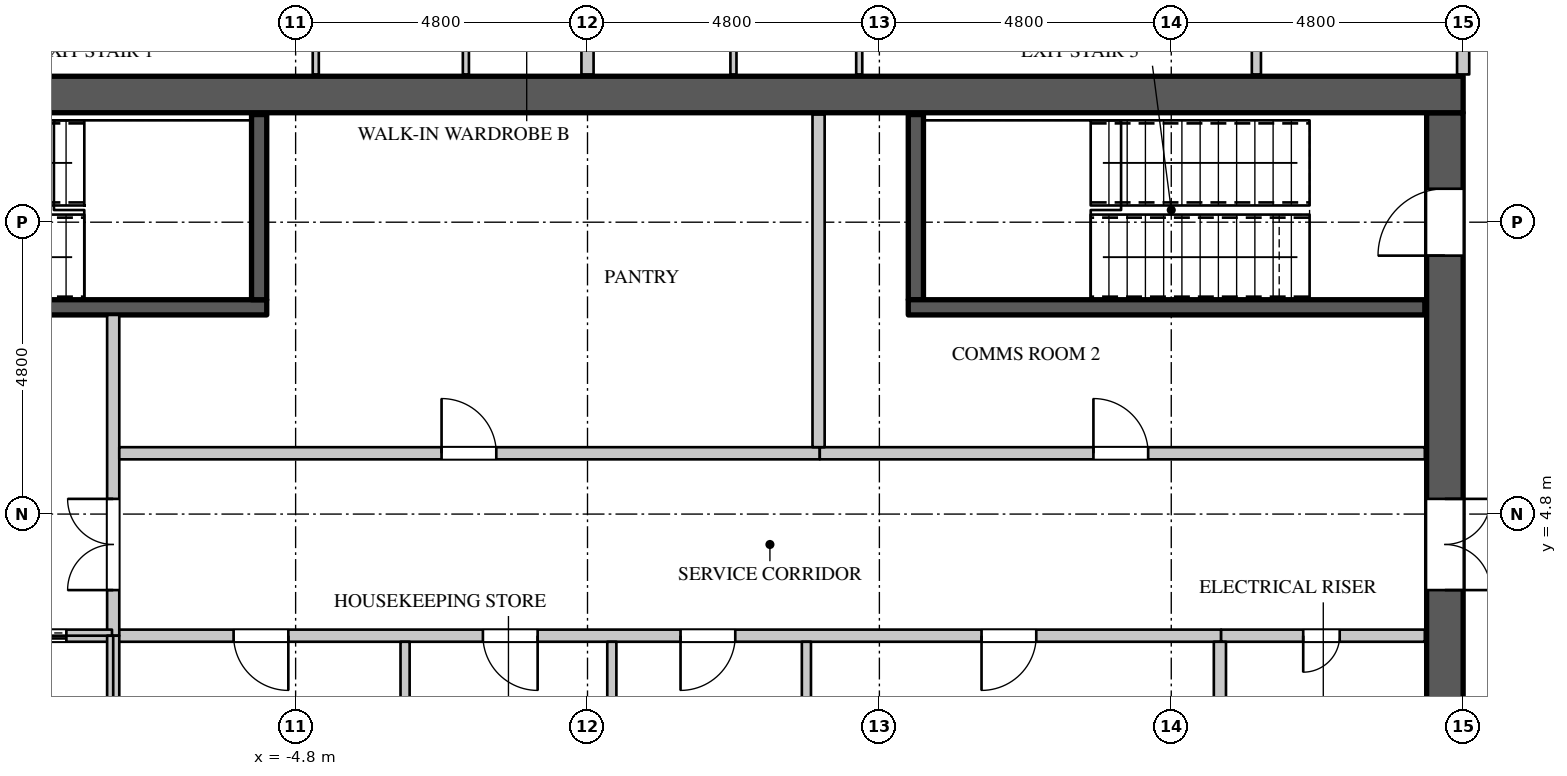
"""IFC4 building model, lengths in metres.
Left out: names, types, materials, properties, quantities, classifications, styles, units other than length and angle.
Written with IfcOpenShell. Run it as: python <this file> out.ifc"""

import sys

from ifc_helpers import new_model, si_unit, direction, frame, frame_2d, origin, place, context, subcontext, project, spatial, rectangle, extrude, element, fill, save


model = new_model("IFC4")
c1 = context("Model", 3, precision=1e-05, world=origin(), true_north=direction((0.0, 1.0)))
c2 = subcontext(c1, "Body", "Model", "MODEL_VIEW")
j1 = project(units=[si_unit("LENGTHUNIT", "METRE"), si_unit("PLANEANGLEUNIT", "RADIAN")], contexts=[c1])
p1 = place(None, origin())
s1 = spatial("IfcSite", under=j1, at=p1, CompositionType="ELEMENT")
p2 = place(p1, origin())
s2 = spatial("IfcBuilding", under=s1, at=p2, CompositionType="ELEMENT")
p3 = place(p2, frame((0.0, 0.0, 306.3)))
s3 = spatial("IfcBuildingStorey", under=s2, at=p3, CompositionType="ELEMENT", Elevation=306.3)
p4 = place(p3, frame((-14.4, 11.7, 0.0), z_axis=(0.0, 0.0, 1.0), x_axis=(1.0, 0.0, 0.0)))
e1 = element("IfcWall", 1, at=p4, inside=s3, PredefinedType="SHEAR", context=c2, shape_type="SweptSolid", body=[
    extrude(rectangle(XDim=28.8, YDim=0.6, at=frame_2d((14.4, 0.0))), origin(), (0.0, 0.0, 1.0), 4.2),
])
p5 = place(p3, frame((14.1, -11.4, 0.0), z_axis=(0.0, 0.0, 1.0), x_axis=(0.0, 1.0, 0.0)))
e2 = element("IfcWall", 2, at=p5, inside=s3, PredefinedType="SHEAR", context=c2, shape_type="SweptSolid", body=[
    extrude(rectangle(XDim=22.8, YDim=0.6, at=frame_2d((11.4, 0.0))), origin(), (0.0, 0.0, 1.0), 4.2),
])
p6 = place(p5, frame((20.45, 0.0, 0.0)))
e3 = element("IfcOpeningElement", 3, at=p6, cuts=e2, PredefinedType="OPENING", context=c2, shape_type="SweptSolid", body=[
    extrude(rectangle(XDim=1.1, YDim=2.2, at=frame_2d((0.55, 1.1))), frame((0.0, 0.31, 0.0), z_axis=(0.0, -1.0, 0.0), x_axis=(1.0, 0.0, 0.0)), (0.0, 0.0, 1.0), 0.62),
])
p7 = place(p5, frame((1.25, 0.0, 0.0)))
e4 = element("IfcOpeningElement", 4, at=p7, cuts=e2, PredefinedType="OPENING", context=c2, shape_type="SweptSolid", body=[
    extrude(rectangle(XDim=1.1, YDim=2.2, at=frame_2d((0.55, 1.1))), frame((0.0, 0.31, 0.0), z_axis=(0.0, -1.0, 0.0), x_axis=(1.0, 0.0, 0.0)), (0.0, 0.0, 1.0), 0.62),
])
p8 = place(p5, frame((14.95, 0.0, 0.0)))
e5 = element("IfcOpeningElement", 5, at=p8, cuts=e2, PredefinedType="OPENING", context=c2, shape_type="SweptSolid", body=[
    extrude(rectangle(XDim=1.5, YDim=2.4, at=frame_2d((0.75, 1.2))), frame((0.0, 0.31, 0.0), z_axis=(0.0, -1.0, 0.0), x_axis=(1.0, 0.0, 0.0)), (0.0, 0.0, 1.0), 0.62),
])
p9 = place(p5, frame((6.35, 0.0, 0.0)))
e6 = element("IfcOpeningElement", 6, at=p9, cuts=e2, PredefinedType="OPENING", context=c2, shape_type="SweptSolid", body=[
    extrude(rectangle(XDim=1.5, YDim=2.4, at=frame_2d((0.75, 1.2))), frame((0.0, 0.31, 0.0), z_axis=(0.0, -1.0, 0.0), x_axis=(1.0, 0.0, 0.0)), (0.0, 0.0, 1.0), 0.62),
])
p10 = place(p3, frame((-7.82, 2.8, 0.0), z_axis=(0.0, 0.0, 1.0), x_axis=(1.0, 0.0, 0.0)))
e7 = element("IfcWall", 7, at=p10, inside=s3, PredefinedType="PARTITIONING", context=c2, shape_type="SweptSolid", body=[
    extrude(rectangle(XDim=18.24, YDim=0.2, at=frame_2d((9.12, 0.0))), origin(), (0.0, 0.0, 1.0), 3.9),
])
p11 = place(p10, frame((2.0, 0.0, 0.0)))
e8 = element("IfcOpeningElement", 8, at=p11, cuts=e7, PredefinedType="OPENING", context=c2, shape_type="SweptSolid", body=[
    extrude(rectangle(XDim=0.9, YDim=2.2, at=frame_2d((0.45, 1.1))), frame((0.0, 0.11, 0.0), z_axis=(0.0, -1.0, 0.0), x_axis=(1.0, 0.0, 0.0)), (0.0, 0.0, 1.0), 0.22),
])
p12 = place(p10, frame((6.1, 0.0, 0.0)))
e9 = element("IfcOpeningElement", 9, at=p12, cuts=e7, PredefinedType="OPENING", context=c2, shape_type="SweptSolid", body=[
    extrude(rectangle(XDim=0.9, YDim=2.2, at=frame_2d((0.45, 1.1))), frame((0.0, 0.11, 0.0), z_axis=(0.0, -1.0, 0.0), x_axis=(1.0, 0.0, 0.0)), (0.0, 0.0, 1.0), 0.22),
])
p13 = place(p10, frame((9.35, 0.0, 0.0)))
e10 = element("IfcOpeningElement", 10, at=p13, cuts=e7, PredefinedType="OPENING", context=c2, shape_type="SweptSolid", body=[
    extrude(rectangle(XDim=0.9, YDim=2.2, at=frame_2d((0.45, 1.1))), frame((0.0, 0.11, 0.0), z_axis=(0.0, -1.0, 0.0), x_axis=(1.0, 0.0, 0.0)), (0.0, 0.0, 1.0), 0.22),
])
p14 = place(p10, frame((14.3, 0.0, 0.0)))
e11 = element("IfcOpeningElement", 11, at=p14, cuts=e7, PredefinedType="OPENING", context=c2, shape_type="SweptSolid", body=[
    extrude(rectangle(XDim=0.9, YDim=2.2, at=frame_2d((0.45, 1.1))), frame((0.0, 0.11, 0.0), z_axis=(0.0, -1.0, 0.0), x_axis=(1.0, 0.0, 0.0)), (0.0, 0.0, 1.0), 0.22),
])
p15 = place(p3, frame((-7.8, 2.8, 0.0), z_axis=(0.0, 0.0, 1.0), x_axis=(0.0, 1.0, 0.0)))
e12 = element("IfcWall", 12, at=p15, inside=s3, PredefinedType="PARTITIONING", context=c2, shape_type="SweptSolid", body=[
    extrude(rectangle(XDim=5.275, YDim=0.2, at=frame_2d((2.637, 0.0))), origin(), (0.0, 0.0, 1.0), 3.9),
])
p16 = place(p15, frame((0.75, 0.0, 0.0)))
e13 = element("IfcOpeningElement", 13, at=p16, cuts=e12, PredefinedType="OPENING", context=c2, shape_type="SweptSolid", body=[
    extrude(rectangle(XDim=1.5, YDim=2.4, at=frame_2d((0.75, 1.2))), frame((0.0, 0.11, 0.0), z_axis=(0.0, -1.0, 0.0), x_axis=(1.0, 0.0, 0.0)), (0.0, 0.0, 1.0), 0.22),
])
p17 = place(p3, frame((-7.7, 5.8, 0.0), z_axis=(0.0, 0.0, 1.0), x_axis=(1.0, 0.0, 0.0)))
e14 = element("IfcWall", 14, at=p17, inside=s3, PredefinedType="PARTITIONING", context=c2, shape_type="SweptSolid", body=[
    extrude(rectangle(XDim=11.52, YDim=0.2, at=frame_2d((5.76, 0.0))), origin(), (0.0, 0.0, 1.0), 3.9),
])
p18 = place(p17, frame((5.3, 0.0, 0.0)))
e15 = element("IfcOpeningElement", 15, at=p18, cuts=e14, PredefinedType="OPENING", context=c2, shape_type="SweptSolid", body=[
    extrude(rectangle(XDim=0.9, YDim=2.2, at=frame_2d((0.45, 1.1))), frame((0.0, 0.11, 0.0), z_axis=(0.0, -1.0, 0.0), x_axis=(1.0, 0.0, 0.0)), (0.0, 0.0, 1.0), 0.22),
])
p19 = place(p3, frame((14.4, 12.03, 0.0), z_axis=(0.0, 0.0, 1.0), x_axis=(0.0, 1.0, 0.0)))
e16 = element("IfcWall", 16, at=p19, inside=s3, PredefinedType="PARTITIONING", context=c2, shape_type="SweptSolid", body=[
    extrude(rectangle(XDim=2.27, YDim=0.2, at=frame_2d((1.135, 0.0))), origin(), (0.0, 0.0, 1.0), 3.9),
])
for number, where, z_axis, x_axis in (
    (17, (-3.0, 0.1, 0.0), (0.0, 0.0, 1.0), (0.0, 1.0, 0.0)),
    (18, (0.4, 0.1, 0.0), (0.0, 0.0, 1.0), (0.0, 1.0, 0.0)),
    (19, (3.6, 0.1, 0.0), (0.0, 0.0, 1.0), (0.0, 1.0, 0.0)),
):
    element("IfcWall", number, at=place(p3, frame(where, z_axis=z_axis, x_axis=x_axis)), inside=s3, PredefinedType="PARTITIONING", context=c2, shape_type="SweptSolid", body=[
        extrude(rectangle(XDim=2.6, YDim=0.15, at=frame_2d((1.3, 0.0))), origin(), (0.0, 0.0, 1.0), 3.9),
    ])
p20 = place(p3, frame((11.0, 12.03, 0.0), z_axis=(0.0, 0.0, 1.0), x_axis=(0.0, 1.0, 0.0)))
e20 = element("IfcWall", 20, at=p20, inside=s3, PredefinedType="PARTITIONING", context=c2, shape_type="SweptSolid", body=[
    extrude(rectangle(XDim=5.045, YDim=0.15, at=frame_2d((2.522, 0.0))), origin(), (0.0, 0.0, 1.0), 3.9),
])
p21 = place(p20, frame((2.0, 0.0, 0.0)))
e21 = element("IfcOpeningElement", 21, at=p21, cuts=e20, PredefinedType="OPENING", context=c2, shape_type="SweptSolid", body=[
    extrude(rectangle(XDim=0.95, YDim=2.2, at=frame_2d((0.475, 1.1))), frame((0.0, 0.085, 0.0), z_axis=(0.0, -1.0, 0.0), x_axis=(1.0, 0.0, 0.0)), (0.0, 0.0, 1.0), 0.17),
])
p22 = place(p3, frame((0.0, 12.03, 0.0), z_axis=(0.0, 0.0, 1.0), x_axis=(0.0, 1.0, 0.0)))
e22 = element("IfcWall", 22, at=p22, inside=s3, PredefinedType="PARTITIONING", context=c2, shape_type="SweptSolid", body=[
    extrude(rectangle(XDim=14.425, YDim=0.2, at=frame_2d((7.212, 0.0))), origin(), (0.0, 0.0, 1.0), 3.9),
])
p23 = place(p3, frame((3.82, 5.8, 0.0), z_axis=(0.0, 0.0, 1.0), x_axis=(1.0, 0.0, 0.0)))
e23 = element("IfcWall", 23, at=p23, inside=s3, PredefinedType="PARTITIONING", context=c2, shape_type="SweptSolid", body=[
    extrude(rectangle(XDim=9.95, YDim=0.2, at=frame_2d((4.975, 0.0))), origin(), (0.0, 0.0, 1.0), 3.9),
])
p24 = place(p23, frame((4.5, 0.0, 0.0)))
e24 = element("IfcOpeningElement", 24, at=p24, cuts=e23, PredefinedType="OPENING", context=c2, shape_type="SweptSolid", body=[
    extrude(rectangle(XDim=0.9, YDim=2.2, at=frame_2d((0.45, 1.1))), frame((0.0, 0.11, 0.0), z_axis=(0.0, -1.0, 0.0), x_axis=(1.0, 0.0, 0.0)), (0.0, 0.0, 1.0), 0.22),
])
p25 = place(p3, frame((3.8, 5.9, 0.0), z_axis=(0.0, 0.0, 1.0), x_axis=(0.0, 1.0, 0.0)))
e25 = element("IfcWall", 25, at=p25, inside=s3, PredefinedType="PARTITIONING", context=c2, shape_type="SweptSolid", body=[
    extrude(rectangle(XDim=5.47, YDim=0.2, at=frame_2d((2.735, 0.0))), origin(), (0.0, 0.0, 1.0), 3.9),
])
p26 = place(p3, frame((10.42, 2.8, 0.0), z_axis=(0.0, 0.0, 1.0), x_axis=(1.0, 0.0, 0.0)))
e26 = element("IfcWall", 26, at=p26, inside=s3, PredefinedType="PARTITIONING", context=c2, shape_type="SweptSolid", body=[
    extrude(rectangle(XDim=3.35, YDim=0.2, at=frame_2d((1.675, 0.0))), origin(), (0.0, 0.0, 1.0), 3.9),
])
p27 = place(p26, frame((1.35, 0.0, 0.0)))
e27 = element("IfcOpeningElement", 27, at=p27, cuts=e26, PredefinedType="OPENING", context=c2, shape_type="SweptSolid", body=[
    extrude(rectangle(XDim=0.6, YDim=2.0, at=frame_2d((0.3, 1.0))), frame((0.0, 0.11, 0.0), z_axis=(0.0, -1.0, 0.0), x_axis=(1.0, 0.0, 0.0)), (0.0, 0.0, 1.0), 0.22),
])
p28 = place(p3, frame((10.4, 0.1, 0.0), z_axis=(0.0, 0.0, 1.0), x_axis=(0.0, 1.0, 0.0)))
e28 = element("IfcWall", 28, at=p28, inside=s3, PredefinedType="PARTITIONING", context=c2, shape_type="SweptSolid", body=[
    extrude(rectangle(XDim=2.6, YDim=0.2, at=frame_2d((1.3, 0.0))), origin(), (0.0, 0.0, 1.0), 3.9),
])
p29 = place(p3, frame((-13.77, 2.8, 0.0), z_axis=(0.0, 0.0, 1.0), x_axis=(1.0, 0.0, 0.0)))
e29 = element("IfcWall", 29, at=p29, inside=s3, PredefinedType="PARTITIONING", context=c2, shape_type="SweptSolid", body=[
    extrude(rectangle(XDim=5.95, YDim=0.2, at=frame_2d((2.975, 0.0))), origin(), (0.0, 0.0, 1.0), 3.9),
])
p30 = place(p29, frame((1.1, 0.0, 0.0)))
e30 = element("IfcOpeningElement", 30, at=p30, cuts=e29, PredefinedType="OPENING", context=c2, shape_type="SweptSolid", body=[
    extrude(rectangle(XDim=1.1, YDim=2.2, at=frame_2d((0.55, 1.1))), frame((0.0, 0.11, 0.0), z_axis=(0.0, -1.0, 0.0), x_axis=(1.0, 0.0, 0.0)), (0.0, 0.0, 1.0), 0.22),
])
p31 = place(p29, frame((4.1, 0.0, 0.0)))
e31 = element("IfcOpeningElement", 31, at=p31, cuts=e29, PredefinedType="OPENING", context=c2, shape_type="SweptSolid", body=[
    extrude(rectangle(XDim=1.1, YDim=2.2, at=frame_2d((0.55, 1.1))), frame((0.0, 0.11, 0.0), z_axis=(0.0, -1.0, 0.0), x_axis=(1.0, 0.0, 0.0)), (0.0, 0.0, 1.0), 0.22),
])
p32 = place(p3, frame((-7.8, 0.0, 0.0), z_axis=(0.0, 0.0, 1.0), x_axis=(0.0, 1.0, 0.0)))
e32 = element("IfcWall", 32, at=p32, inside=s3, PredefinedType="PARTITIONING", context=c2, shape_type="SweptSolid", body=[
    extrude(rectangle(XDim=2.8, YDim=0.2, at=frame_2d((1.4, 0.0))), origin(), (0.0, 0.0, 1.0), 3.9),
])
p33 = place(p3, frame((-13.77, 8.2, 0.0), z_axis=(0.0, 0.0, 1.0), x_axis=(1.0, 0.0, 0.0)))
e33 = element("IfcWall", 33, at=p33, inside=s3, PredefinedType="SHEAR", context=c2, shape_type="SweptSolid", body=[
    extrude(rectangle(XDim=8.495, YDim=0.25, at=frame_2d((4.248, 0.0))), origin(), (0.0, 0.0, 1.0), 3.9),
])
p34 = place(p33, frame((0.15, 0.0, 0.0)))
e34 = element("IfcOpeningElement", 34, at=p34, cuts=e33, PredefinedType="OPENING", context=c2, shape_type="SweptSolid", body=[
    extrude(rectangle(XDim=1.1, YDim=2.2, at=frame_2d((0.55, 1.1))), frame((0.0, 0.135, 0.0), z_axis=(0.0, -1.0, 0.0), x_axis=(1.0, 0.0, 0.0)), (0.0, 0.0, 1.0), 0.27),
])
for number, where, z_axis, x_axis in (
    (35, (-5.4, 8.325, 0.0), (0.0, 0.0, 1.0), (0.0, 1.0, 0.0)),
    (36, (5.4, 8.325, 0.0), (0.0, 0.0, 1.0), (0.0, 1.0, 0.0)),
):
    element("IfcWall", number, at=place(p3, frame(where, z_axis=z_axis, x_axis=x_axis)), inside=s3, PredefinedType="SHEAR", context=c2, shape_type="SweptSolid", body=[
        extrude(rectangle(XDim=3.045, YDim=0.25, at=frame_2d((1.522, 0.0))), origin(), (0.0, 0.0, 1.0), 3.9),
    ])
p35 = place(p3, frame((5.275, 8.2, 0.0), z_axis=(0.0, 0.0, 1.0), x_axis=(1.0, 0.0, 0.0)))
e37 = element("IfcWall", 37, at=p35, inside=s3, PredefinedType="SHEAR", context=c2, shape_type="SweptSolid", body=[
    extrude(rectangle(XDim=8.495, YDim=0.25, at=frame_2d((4.248, 0.0))), origin(), (0.0, 0.0, 1.0), 3.9),
])
p36 = place(p3, frame((-4.469, 12.03, 0.0), z_axis=(0.0, 0.0, 1.0), x_axis=(0.0, 1.0, 0.0)))
e38 = element("IfcWall", 38, at=p36, inside=s3, PredefinedType="PARTITIONING", context=c2, shape_type="SweptSolid", body=[
    extrude(rectangle(XDim=5.75, YDim=0.1, at=frame_2d((2.875, 0.0))), origin(), (0.0, 0.0, 1.0), 3.3),
])
p37 = place(p3, frame((-2.0, 12.03, 0.0), z_axis=(0.0, 0.0, 1.0), x_axis=(0.0, 1.0, 0.0)))
e39 = element("IfcWall", 39, at=p37, inside=s3, PredefinedType="PARTITIONING", context=c2, shape_type="SweptSolid", body=[
    extrude(rectangle(XDim=5.72, YDim=0.1, at=frame_2d((2.86, 0.0))), origin(), (0.0, 0.0, 1.0), 3.9),
])
p38 = place(p3, frame((2.4, 12.03, 0.0), z_axis=(0.0, 0.0, 1.0), x_axis=(0.0, 1.0, 0.0)))
e40 = element("IfcWall", 40, at=p38, inside=s3, PredefinedType="PARTITIONING", context=c2, shape_type="SweptSolid", body=[
    extrude(rectangle(XDim=5.52, YDim=0.1, at=frame_2d((2.76, 0.0))), origin(), (0.0, 0.0, 1.0), 3.9),
])
p39 = place(p3, frame((4.469, 12.03, 0.0), z_axis=(0.0, 0.0, 1.0), x_axis=(0.0, 1.0, 0.0)))
e41 = element("IfcWall", 41, at=p39, inside=s3, PredefinedType="PARTITIONING", context=c2, shape_type="SweptSolid", body=[
    extrude(rectangle(XDim=5.55, YDim=0.1, at=frame_2d((2.775, 0.0))), origin(), (0.0, 0.0, 1.0), 3.3),
])
p40 = place(p27, origin())
e42 = element("IfcDoor", 42, at=p40, inside=s3, OperationType="SINGLE_SWING_RIGHT", PredefinedType="DOOR", context=c2, shape_type="SweptSolid", body=[
    extrude(rectangle(XDim=0.6, YDim=2.0, at=frame_2d((0.3, 1.0))), frame((0.0, 0.025, 0.0), z_axis=(0.0, -1.0, 0.0), x_axis=(1.0, 0.0, 0.0)), (0.0, 0.0, 1.0), 0.05),
])
fill(e27, e42)
p41 = place(p18, origin())
e43 = element("IfcDoor", 43, at=p41, inside=s3, OperationType="SINGLE_SWING_LEFT", PredefinedType="DOOR", context=c2, shape_type="SweptSolid", body=[
    extrude(rectangle(XDim=0.9, YDim=2.2, at=frame_2d((0.45, 1.1))), frame((0.0, 0.025, 0.0), z_axis=(0.0, -1.0, 0.0), x_axis=(1.0, 0.0, 0.0)), (0.0, 0.0, 1.0), 0.05),
])
fill(e15, e43)
p42 = place(p24, origin())
e44 = element("IfcDoor", 44, at=p42, inside=s3, OperationType="SINGLE_SWING_LEFT", PredefinedType="DOOR", context=c2, shape_type="SweptSolid", body=[
    extrude(rectangle(XDim=0.9, YDim=2.2, at=frame_2d((0.45, 1.1))), frame((0.0, 0.025, 0.0), z_axis=(0.0, -1.0, 0.0), x_axis=(1.0, 0.0, 0.0)), (0.0, 0.0, 1.0), 0.05),
])
fill(e24, e44)
p43 = place(p11, origin())
e45 = element("IfcDoor", 45, at=p43, inside=s3, OperationType="SINGLE_SWING_LEFT", PredefinedType="DOOR", context=c2, shape_type="SweptSolid", body=[
    extrude(rectangle(XDim=0.9, YDim=2.2, at=frame_2d((0.45, 1.1))), frame((0.0, 0.025, 0.0), z_axis=(0.0, -1.0, 0.0), x_axis=(1.0, 0.0, 0.0)), (0.0, 0.0, 1.0), 0.05),
])
fill(e8, e45)
p44 = place(p12, origin())
e46 = element("IfcDoor", 46, at=p44, inside=s3, OperationType="SINGLE_SWING_LEFT", PredefinedType="DOOR", context=c2, shape_type="SweptSolid", body=[
    extrude(rectangle(XDim=0.9, YDim=2.2, at=frame_2d((0.45, 1.1))), frame((0.0, 0.025, 0.0), z_axis=(0.0, -1.0, 0.0), x_axis=(1.0, 0.0, 0.0)), (0.0, 0.0, 1.0), 0.05),
])
fill(e9, e46)
p45 = place(p13, origin())
e47 = element("IfcDoor", 47, at=p45, inside=s3, OperationType="SINGLE_SWING_RIGHT", PredefinedType="DOOR", context=c2, shape_type="SweptSolid", body=[
    extrude(rectangle(XDim=0.9, YDim=2.2, at=frame_2d((0.45, 1.1))), frame((0.0, 0.025, 0.0), z_axis=(0.0, -1.0, 0.0), x_axis=(1.0, 0.0, 0.0)), (0.0, 0.0, 1.0), 0.05),
])
fill(e10, e47)
p46 = place(p14, origin())
e48 = element("IfcDoor", 48, at=p46, inside=s3, OperationType="SINGLE_SWING_RIGHT", PredefinedType="DOOR", context=c2, shape_type="SweptSolid", body=[
    extrude(rectangle(XDim=0.9, YDim=2.2, at=frame_2d((0.45, 1.1))), frame((0.0, 0.025, 0.0), z_axis=(0.0, -1.0, 0.0), x_axis=(1.0, 0.0, 0.0)), (0.0, 0.0, 1.0), 0.05),
])
fill(e11, e48)
p47 = place(p31, origin())
e49 = element("IfcDoor", 49, at=p47, inside=s3, OperationType="DOUBLE_DOOR_SLIDING", PredefinedType="DOOR", context=c2, shape_type="SweptSolid", body=[
    extrude(rectangle(XDim=1.1, YDim=2.2, at=frame_2d((0.55, 1.1))), frame((0.0, 0.025, 0.0), z_axis=(0.0, -1.0, 0.0), x_axis=(1.0, 0.0, 0.0)), (0.0, 0.0, 1.0), 0.05),
])
fill(e31, e49)
p48 = place(p16, origin())
e50 = element("IfcDoor", 50, at=p48, inside=s3, OperationType="DOUBLE_DOOR_SINGLE_SWING", PredefinedType="DOOR", context=c2, shape_type="SweptSolid", body=[
    extrude(rectangle(XDim=1.5, YDim=2.4, at=frame_2d((0.75, 1.2))), frame((0.0, 0.025, 0.0), z_axis=(0.0, -1.0, 0.0), x_axis=(1.0, 0.0, 0.0)), (0.0, 0.0, 1.0), 0.05),
])
fill(e13, e50)
p49 = place(p6, origin())
e51 = element("IfcDoor", 51, at=p49, inside=s3, OperationType="SINGLE_SWING_LEFT", PredefinedType="DOOR", context=c2, shape_type="SweptSolid", body=[
    extrude(rectangle(XDim=1.1, YDim=2.2, at=frame_2d((0.55, 1.1))), frame((0.0, 0.295, 0.0), z_axis=(0.0, -1.0, 0.0), x_axis=(1.0, 0.0, 0.0)), (0.0, 0.0, 1.0), 0.05),
])
fill(e3, e51)
p50 = place(p8, origin())
e52 = element("IfcDoor", 52, at=p50, inside=s3, OperationType="DOUBLE_DOOR_SINGLE_SWING", PredefinedType="DOOR", context=c2, shape_type="SweptSolid", body=[
    extrude(rectangle(XDim=1.5, YDim=2.4, at=frame_2d((0.75, 1.2))), frame((0.0, -0.245, 0.0), z_axis=(0.0, -1.0, 0.0), x_axis=(1.0, 0.0, 0.0)), (0.0, 0.0, 1.0), 0.05),
])
fill(e5, e52)
save(model, sys.argv[1])
